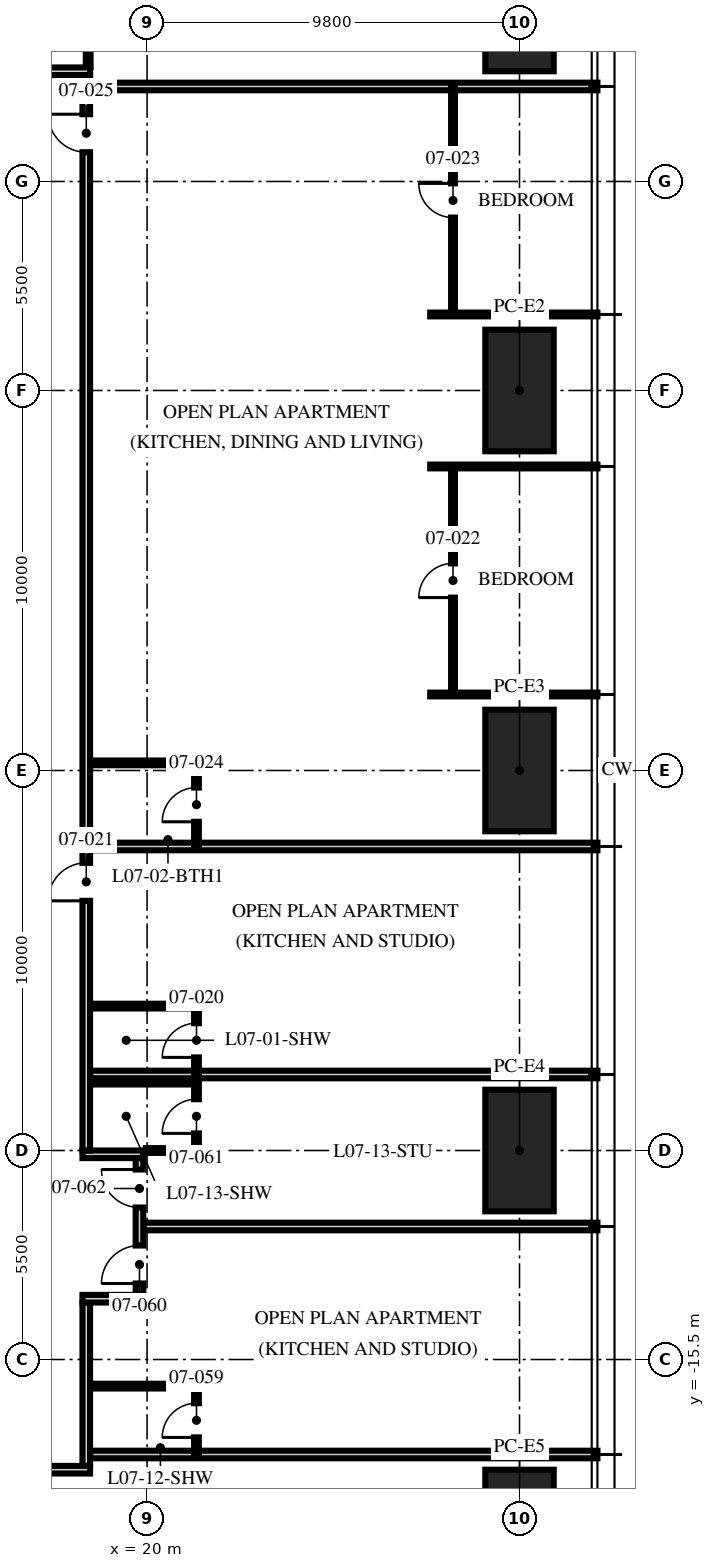
"""IFC4 building model, lengths in metres.
Left out: names, types, materials, properties, quantities, classifications, styles, units other than length and angle.
Written with IfcOpenShell. Run it as: python <this file> out.ifc"""

import sys

from ifc_helpers import new_model, si_unit, direction, frame, frame_2d, origin, origin_2d, place, context, subcontext, project, spatial, rectangle, hollow_rectangle, extrude, element, fill, save


model = new_model("IFC4")
c1 = context("Model", 3, precision=1e-05, world=origin(), true_north=direction((0.0, 1.0)))
c2 = subcontext(c1, "Body", "Model", "MODEL_VIEW")
j1 = project(units=[si_unit("LENGTHUNIT", "METRE"), si_unit("PLANEANGLEUNIT", "RADIAN")], contexts=[c1])
p1 = place(None, origin())
s1 = spatial("IfcSite", under=j1, at=p1, CompositionType="ELEMENT")
p2 = place(p1, origin())
s2 = spatial("IfcBuilding", under=s1, at=p2, CompositionType="ELEMENT")
p3 = place(p2, frame((0.0, 0.0, 32.25)))
s3 = spatial("IfcBuildingStorey", under=s2, at=p3, CompositionType="ELEMENT", Elevation=32.25)
for number, where, z_axis, x_axis in (
    (1, (29.8, 20.0, 0.0), (0.0, 0.0, 1.0), (0.0, 1.0, 0.0)),
    (2, (29.8, 10.0, 0.0), (0.0, 0.0, 1.0), (0.0, 1.0, 0.0)),
    (3, (29.8, 0.0, 0.0), (0.0, 0.0, 1.0), (0.0, 1.0, 0.0)),
    (4, (29.8, -10.0, 0.0), (0.0, 0.0, 1.0), (0.0, 1.0, 0.0)),
    (5, (29.8, -20.0, 0.0), (0.0, 0.0, 1.0), (0.0, 1.0, 0.0)),
):
    element("IfcColumn", number, at=place(p3, frame(where, z_axis=z_axis, x_axis=x_axis)), inside=s3, PredefinedType="COLUMN", context=c2, shape_type="SweptSolid", body=[
        extrude(hollow_rectangle(XDim=3.2, YDim=1.8, WallThickness=0.2, at=origin_2d()), origin(), (0.0, 0.0, 1.0), 3.75),
    ])
for number, where, z_axis, x_axis in (
    (6, (18.5, -8.0, 0.0), (0.0, 0.0, 1.0), (1.0, 0.0, 0.0)),
    (7, (18.5, -2.0, 0.0), (0.0, 0.0, 1.0), (1.0, 0.0, 0.0)),
):
    element("IfcWall", number, at=place(p3, frame(where, z_axis=z_axis, x_axis=x_axis)), inside=s3, PredefinedType="PARTITIONING", context=c2, shape_type="SweptSolid", body=[
        extrude(rectangle(XDim=13.35, YDim=0.2, at=frame_2d((6.675, 0.0))), origin(), (0.0, 0.0, 1.0), 2.71),
    ])
for number, where, z_axis, x_axis in (
    (8, (27.45, 2.0, 0.0), (0.0, 0.0, 1.0), (1.0, 0.0, 0.0)),
    (9, (27.45, 8.0, 0.0), (0.0, 0.0, 1.0), (1.0, 0.0, 0.0)),
    (10, (27.45, 12.0, 0.0), (0.0, 0.0, 1.0), (1.0, 0.0, 0.0)),
):
    element("IfcWall", number, at=place(p3, frame(where, z_axis=z_axis, x_axis=x_axis)), inside=s3, PredefinedType="PARTITIONING", context=c2, shape_type="SweptSolid", body=[
        extrude(rectangle(XDim=4.4, YDim=0.1, at=frame_2d((2.2, 0.0))), origin(), (0.0, 0.0, 1.0), 2.71),
    ])
for number, where, z_axis, x_axis in (
    (11, (18.5, 18.0, 0.0), (0.0, 0.0, 1.0), (1.0, 0.0, 0.0)),
    (12, (18.5, -18.0, 0.0), (0.0, 0.0, 1.0), (1.0, 0.0, 0.0)),
):
    element("IfcWall", number, at=place(p3, frame(where, z_axis=z_axis, x_axis=x_axis)), inside=s3, PredefinedType="PARTITIONING", context=c2, shape_type="SweptSolid", body=[
        extrude(rectangle(XDim=13.35, YDim=0.2, at=frame_2d((6.675, 0.0))), origin(), (0.0, 0.0, 1.0), 2.3),
    ])
p4 = place(p3, frame((19.9, -12.0, 0.0), z_axis=(0.0, 0.0, 1.0), x_axis=(1.0, 0.0, 0.0)))
e13 = element("IfcWall", 13, at=p4, inside=s3, PredefinedType="PARTITIONING", context=c2, shape_type="SweptSolid", body=[
    extrude(rectangle(XDim=11.95, YDim=0.2, at=frame_2d((5.975, 0.0))), origin(), (0.0, 0.0, 1.0), 2.71),
])
p5 = place(p3, frame((21.3, -8.0, 0.0), z_axis=(0.0, 0.0, 1.0), x_axis=(0.0, 1.0, 0.0)))
e14 = element("IfcWall", 14, at=p5, inside=s3, PredefinedType="PARTITIONING", context=c2, shape_type="SweptSolid", body=[
    extrude(rectangle(XDim=1.8, YDim=0.125, at=frame_2d((0.9, 0.0))), origin(), (0.0, 0.0, 1.0), 3.5),
])
p6 = place(p5, frame((0.45, 0.0, 0.0)))
e15 = element("IfcOpeningElement", 15, at=p6, cuts=e14, PredefinedType="OPENING", context=c2, shape_type="SweptSolid", body=[
    extrude(rectangle(XDim=0.9, YDim=2.1, at=frame_2d((0.45, 1.05))), frame((0.0, 0.073, 0.0), z_axis=(0.0, -1.0, 0.0), x_axis=(1.0, 0.0, 0.0)), (0.0, 0.0, 1.0), 0.145),
])
p7 = place(p3, frame((18.5, -6.2, 0.0), z_axis=(0.0, 0.0, 1.0), x_axis=(1.0, 0.0, 0.0)))
e16 = element("IfcWall", 16, at=p7, inside=s3, PredefinedType="PARTITIONING", context=c2, shape_type="SweptSolid", body=[
    extrude(rectangle(XDim=2.8, YDim=0.125, at=frame_2d((1.4, 0.0))), origin(), (0.0, 0.0, 1.0), 3.5),
])
p8 = place(p3, frame((28.05, 2.0, 0.0), z_axis=(0.0, 0.0, 1.0), x_axis=(0.0, 1.0, 0.0)))
e17 = element("IfcWall", 17, at=p8, inside=s3, PredefinedType="PARTITIONING", context=c2, shape_type="SweptSolid", body=[
    extrude(rectangle(XDim=6.0, YDim=0.1, at=frame_2d((3.0, 0.0))), origin(), (0.0, 0.0, 1.0), 2.61),
])
p9 = place(p8, frame((2.55, 0.0, 0.0)))
e18 = element("IfcOpeningElement", 18, at=p9, cuts=e17, PredefinedType="OPENING", context=c2, shape_type="SweptSolid", body=[
    extrude(rectangle(XDim=0.9, YDim=2.1, at=frame_2d((0.45, 1.05))), frame((0.0, 0.06, 0.0), z_axis=(0.0, -1.0, 0.0), x_axis=(1.0, 0.0, 0.0)), (0.0, 0.0, 1.0), 0.12),
])
p10 = place(p3, frame((28.05, 12.0, 0.0), z_axis=(0.0, 0.0, 1.0), x_axis=(0.0, 1.0, 0.0)))
e19 = element("IfcWall", 19, at=p10, inside=s3, PredefinedType="PARTITIONING", context=c2, shape_type="SweptSolid", body=[
    extrude(rectangle(XDim=6.0, YDim=0.1, at=frame_2d((3.0, 0.0))), origin(), (0.0, 0.0, 1.0), 2.61),
])
p11 = place(p10, frame((2.55, 0.0, 0.0)))
e20 = element("IfcOpeningElement", 20, at=p11, cuts=e19, PredefinedType="OPENING", context=c2, shape_type="SweptSolid", body=[
    extrude(rectangle(XDim=0.9, YDim=2.1, at=frame_2d((0.45, 1.05))), frame((0.0, 0.06, 0.0), z_axis=(0.0, -1.0, 0.0), x_axis=(1.0, 0.0, 0.0)), (0.0, 0.0, 1.0), 0.12),
])
p12 = place(p3, frame((21.3, -2.0, 0.0), z_axis=(0.0, 0.0, 1.0), x_axis=(0.0, 1.0, 0.0)))
e21 = element("IfcWall", 21, at=p12, inside=s3, PredefinedType="PARTITIONING", context=c2, shape_type="SweptSolid", body=[
    extrude(rectangle(XDim=2.2, YDim=0.125, at=frame_2d((1.1, 0.0))), origin(), (0.0, 0.0, 1.0), 2.492),
])
p13 = place(p12, frame((0.65, 0.0, 0.0)))
e22 = element("IfcOpeningElement", 22, at=p13, cuts=e21, PredefinedType="OPENING", context=c2, shape_type="SweptSolid", body=[
    extrude(rectangle(XDim=0.9, YDim=2.1, at=frame_2d((0.45, 1.05))), frame((0.0, 0.073, 0.0), z_axis=(0.0, -1.0, 0.0), x_axis=(1.0, 0.0, 0.0)), (0.0, 0.0, 1.0), 0.145),
])
p14 = place(p3, frame((18.5, 0.2, 0.0), z_axis=(0.0, 0.0, 1.0), x_axis=(1.0, 0.0, 0.0)))
e23 = element("IfcWall", 23, at=p14, inside=s3, PredefinedType="PARTITIONING", context=c2, shape_type="SweptSolid", body=[
    extrude(rectangle(XDim=2.8, YDim=0.125, at=frame_2d((1.4, 0.0))), origin(), (0.0, 0.0, 1.0), 2.492),
])
p15 = place(p3, frame((18.45, 18.5, 0.0), z_axis=(0.0, 0.0, 1.0), x_axis=(0.0, 1.0, 0.0)))
e24 = element("IfcWall", 24, at=p15, inside=s3, PredefinedType="PARTITIONING", context=c2, shape_type="SweptSolid", body=[
    extrude(rectangle(XDim=2.8, YDim=0.125, at=frame_2d((1.4, 0.0))), origin(), (0.0, 0.0, 1.0), 2.3),
])
p16 = place(p3, frame((21.3, -18.0, 0.0), z_axis=(0.0, 0.0, 1.0), x_axis=(0.0, 1.0, 0.0)))
e25 = element("IfcWall", 25, at=p16, inside=s3, PredefinedType="PARTITIONING", context=c2, shape_type="SweptSolid", body=[
    extrude(rectangle(XDim=1.8, YDim=0.125, at=frame_2d((0.9, 0.0))), origin(), (0.0, 0.0, 1.0), 3.5),
])
p17 = place(p16, frame((0.45, 0.0, 0.0)))
e26 = element("IfcOpeningElement", 26, at=p17, cuts=e25, PredefinedType="OPENING", context=c2, shape_type="SweptSolid", body=[
    extrude(rectangle(XDim=0.9, YDim=2.1, at=frame_2d((0.45, 1.05))), frame((0.0, 0.073, 0.0), z_axis=(0.0, -1.0, 0.0), x_axis=(1.0, 0.0, 0.0)), (0.0, 0.0, 1.0), 0.145),
])
p18 = place(p3, frame((18.5, -16.2, 0.0), z_axis=(0.0, 0.0, 1.0), x_axis=(1.0, 0.0, 0.0)))
e27 = element("IfcWall", 27, at=p18, inside=s3, PredefinedType="PARTITIONING", context=c2, shape_type="SweptSolid", body=[
    extrude(rectangle(XDim=2.8, YDim=0.125, at=frame_2d((1.4, 0.0))), origin(), (0.0, 0.0, 1.0), 3.5),
])
p19 = place(p3, frame((21.3, -10.0, 0.0), z_axis=(0.0, 0.0, 1.0), x_axis=(0.0, 1.0, 0.0)))
e28 = element("IfcWall", 28, at=p19, inside=s3, PredefinedType="PARTITIONING", context=c2, shape_type="SweptSolid", body=[
    extrude(rectangle(XDim=1.8, YDim=0.125, at=frame_2d((0.9, 0.0))), origin(), (0.0, 0.0, 1.0), 2.492),
])
p20 = place(p19, frame((0.45, 0.0, 0.0)))
e29 = element("IfcOpeningElement", 29, at=p20, cuts=e28, PredefinedType="OPENING", context=c2, shape_type="SweptSolid", body=[
    extrude(rectangle(XDim=0.9, YDim=2.1, at=frame_2d((0.45, 1.05))), frame((0.0, 0.073, 0.0), z_axis=(0.0, -1.0, 0.0), x_axis=(1.0, 0.0, 0.0)), (0.0, 0.0, 1.0), 0.145),
])
p21 = place(p3, frame((19.97, -10.0, 0.0), z_axis=(0.0, 0.0, 1.0), x_axis=(1.0, 0.0, 0.0)))
e30 = element("IfcWall", 30, at=p21, inside=s3, PredefinedType="PARTITIONING", context=c2, shape_type="SweptSolid", body=[
    extrude(rectangle(XDim=1.33, YDim=0.125, at=frame_2d((0.665, 0.0))), origin(), (0.0, 0.0, 1.0), 2.492),
])
p22 = place(p3, frame((18.5, -8.2, 0.0), z_axis=(0.0, 0.0, 1.0), x_axis=(1.0, 0.0, 0.0)))
e31 = element("IfcWall", 31, at=p22, inside=s3, PredefinedType="PARTITIONING", context=c2, shape_type="SweptSolid", body=[
    extrude(rectangle(XDim=2.8, YDim=0.125, at=frame_2d((1.4, 0.0))), origin(), (0.0, 0.0, 1.0), 3.5),
])
p23 = place(p3, frame((18.4, -18.3, 0.0), z_axis=(0.0, 0.0, 1.0), x_axis=(0.0, 1.0, 0.0)))
e32 = element("IfcWall", 32, at=p23, inside=s3, PredefinedType="PARTITIONING", context=c2, shape_type="SweptSolid", body=[
    extrude(rectangle(XDim=4.3, YDim=0.2, at=frame_2d((2.15, 0.0))), origin(), (0.0, 0.0, 1.0), 2.3),
])
p24 = place(p3, frame((18.3, -13.9, 0.0), z_axis=(0.0, 0.0, 1.0), x_axis=(1.0, 0.0, 0.0)))
e33 = element("IfcWall", 33, at=p24, inside=s3, PredefinedType="PARTITIONING", context=c2, shape_type="SweptSolid", body=[
    extrude(rectangle(XDim=1.6, YDim=0.2, at=frame_2d((0.8, 0.0))), origin(), (0.0, 0.0, 1.0), 3.5),
])
p25 = place(p3, frame((18.3, -10.1, 0.0), z_axis=(0.0, 0.0, 1.0), x_axis=(1.0, 0.0, 0.0)))
e34 = element("IfcWall", 34, at=p25, inside=s3, PredefinedType="PARTITIONING", context=c2, shape_type="SweptSolid", body=[
    extrude(rectangle(XDim=1.6, YDim=0.2, at=frame_2d((0.8, 0.0))), origin(), (0.0, 0.0, 1.0), 2.492),
])
p26 = place(p3, frame((19.8, -13.8, 0.0), z_axis=(0.0, 0.0, 1.0), x_axis=(0.0, 1.0, 0.0)))
e35 = element("IfcWall", 35, at=p26, inside=s3, PredefinedType="PARTITIONING", context=c2, shape_type="SweptSolid", body=[
    extrude(rectangle(XDim=3.6, YDim=0.2, at=frame_2d((1.8, 0.0))), origin(), (0.0, 0.0, 1.0), 3.5),
])
p27 = place(p26, frame((0.3, 0.0, 0.0)))
e36 = element("IfcOpeningElement", 36, at=p27, cuts=e35, PredefinedType="OPENING", context=c2, shape_type="SweptSolid", body=[
    extrude(rectangle(XDim=1.0, YDim=2.2, at=frame_2d((0.5, 1.1))), frame((0.0, 0.11, 0.0), z_axis=(0.0, -1.0, 0.0), x_axis=(1.0, 0.0, 0.0)), (0.0, 0.0, 1.0), 0.22),
])
p28 = place(p26, frame((2.3, 0.0, 0.0)))
e37 = element("IfcOpeningElement", 37, at=p28, cuts=e35, PredefinedType="OPENING", context=c2, shape_type="SweptSolid", body=[
    extrude(rectangle(XDim=1.0, YDim=2.2, at=frame_2d((0.5, 1.1))), frame((0.0, 0.11, 0.0), z_axis=(0.0, -1.0, 0.0), x_axis=(1.0, 0.0, 0.0)), (0.0, 0.0, 1.0), 0.22),
])
p29 = place(p3, frame((18.4, -10.0, 0.0), z_axis=(0.0, 0.0, 1.0), x_axis=(0.0, 1.0, 0.0)))
e38 = element("IfcWall", 38, at=p29, inside=s3, PredefinedType="PARTITIONING", context=c2, shape_type="SweptSolid", body=[
    extrude(rectangle(XDim=28.3, YDim=0.2, at=frame_2d((14.15, 0.0))), origin(), (0.0, 0.0, 1.0), 2.3),
])
p30 = place(p29, frame((6.57, 0.0, 0.0)))
e39 = element("IfcOpeningElement", 39, at=p30, cuts=e38, PredefinedType="OPENING", context=c2, shape_type="SweptSolid", body=[
    extrude(rectangle(XDim=1.0, YDim=2.2, at=frame_2d((0.5, 1.1))), frame((0.0, 0.11, 0.0), z_axis=(0.0, -1.0, 0.0), x_axis=(1.0, 0.0, 0.0)), (0.0, 0.0, 1.0), 0.22),
])
p31 = place(p29, frame((26.27, 0.0, 0.0)))
e40 = element("IfcOpeningElement", 40, at=p31, cuts=e38, PredefinedType="OPENING", context=c2, shape_type="SweptSolid", body=[
    extrude(rectangle(XDim=1.0, YDim=2.2, at=frame_2d((0.5, 1.1))), frame((0.0, 0.11, 0.0), z_axis=(0.0, -1.0, 0.0), x_axis=(1.0, 0.0, 0.0)), (0.0, 0.0, 1.0), 0.22),
])
p32 = place(p3, frame((-18.5, 18.4, 0.0), z_axis=(0.0, 0.0, 1.0), x_axis=(1.0, 0.0, 0.0)))
e41 = element("IfcWall", 41, at=p32, inside=s3, PredefinedType="PARTITIONING", context=c2, shape_type="SweptSolid", body=[
    extrude(rectangle(XDim=37.0, YDim=0.2, at=frame_2d((18.5, 0.0))), origin(), (0.0, 0.0, 1.0), 2.3),
])
p33 = place(p32, frame((27.1, 0.0, 0.0)))
e42 = element("IfcOpeningElement", 42, at=p33, cuts=e41, PredefinedType="OPENING", context=c2, shape_type="SweptSolid", body=[
    extrude(rectangle(XDim=1.0, YDim=2.2, at=frame_2d((0.5, 1.1))), frame((0.0, 0.11, 0.0), z_axis=(0.0, -1.0, 0.0), x_axis=(1.0, 0.0, 0.0)), (0.0, 0.0, 1.0), 0.22),
])
p34 = place(p32, frame((11.23, 0.0, 0.0)))
e43 = element("IfcOpeningElement", 43, at=p34, cuts=e41, PredefinedType="OPENING", context=c2, shape_type="SweptSolid", body=[
    extrude(rectangle(XDim=1.0, YDim=2.2, at=frame_2d((0.5, 1.1))), frame((0.0, 0.11, 0.0), z_axis=(0.0, -1.0, 0.0), x_axis=(1.0, 0.0, 0.0)), (0.0, 0.0, 1.0), 0.22),
])
p35 = place(p32, frame((6.93, 0.0, 0.0)))
e44 = element("IfcOpeningElement", 44, at=p35, cuts=e41, PredefinedType="OPENING", context=c2, shape_type="SweptSolid", body=[
    extrude(rectangle(XDim=1.0, YDim=2.2, at=frame_2d((0.5, 1.1))), frame((0.0, 0.11, 0.0), z_axis=(0.0, -1.0, 0.0), x_axis=(1.0, 0.0, 0.0)), (0.0, 0.0, 1.0), 0.22),
])
p36 = place(p32, frame((0.93, 0.0, 0.0)))
e45 = element("IfcOpeningElement", 45, at=p36, cuts=e41, PredefinedType="OPENING", context=c2, shape_type="SweptSolid", body=[
    extrude(rectangle(XDim=1.0, YDim=2.2, at=frame_2d((0.5, 1.1))), frame((0.0, 0.11, 0.0), z_axis=(0.0, -1.0, 0.0), x_axis=(1.0, 0.0, 0.0)), (0.0, 0.0, 1.0), 0.22),
])
p37 = place(p3, frame((18.5, -18.4, 0.0), z_axis=(0.0, 0.0, 1.0), x_axis=(-1.0, 0.0, 0.0)))
e46 = element("IfcWall", 46, at=p37, inside=s3, PredefinedType="PARTITIONING", context=c2, shape_type="SweptSolid", body=[
    extrude(rectangle(XDim=24.5, YDim=0.2, at=frame_2d((12.25, 0.0))), origin(), (0.0, 0.0, 1.0), 2.3),
])
p38 = place(p6, origin())
e47 = element("IfcDoor", 47, at=p38, inside=s3, OperationType="SINGLE_SWING_LEFT", PredefinedType="DOOR", context=c2, shape_type="SweptSolid", body=[
    extrude(rectangle(XDim=0.9, YDim=2.1, at=frame_2d((0.45, 1.05))), frame((0.0, 0.025, 0.0), z_axis=(0.0, -1.0, 0.0), x_axis=(1.0, 0.0, 0.0)), (0.0, 0.0, 1.0), 0.05),
])
fill(e15, e47)
p39 = place(p30, origin())
e48 = element("IfcDoor", 48, at=p39, inside=s3, OperationType="SINGLE_SWING_LEFT", PredefinedType="DOOR", context=c2, shape_type="SweptSolid", body=[
    extrude(rectangle(XDim=1.0, YDim=2.2, at=frame_2d((0.5, 1.1))), frame((0.0, 0.025, 0.0), z_axis=(0.0, -1.0, 0.0), x_axis=(1.0, 0.0, 0.0)), (0.0, 0.0, 1.0), 0.05),
])
fill(e39, e48)
p40 = place(p9, origin())
e49 = element("IfcDoor", 49, at=p40, inside=s3, OperationType="SINGLE_SWING_LEFT", PredefinedType="DOOR", context=c2, shape_type="SweptSolid", body=[
    extrude(rectangle(XDim=0.9, YDim=2.1, at=frame_2d((0.45, 1.05))), frame((0.0, 0.025, 0.0), z_axis=(0.0, -1.0, 0.0), x_axis=(1.0, 0.0, 0.0)), (0.0, 0.0, 1.0), 0.05),
])
fill(e18, e49)
p41 = place(p11, origin())
e50 = element("IfcDoor", 50, at=p41, inside=s3, OperationType="SINGLE_SWING_RIGHT", PredefinedType="DOOR", context=c2, shape_type="SweptSolid", body=[
    extrude(rectangle(XDim=0.9, YDim=2.1, at=frame_2d((0.45, 1.05))), frame((0.0, 0.025, 0.0), z_axis=(0.0, -1.0, 0.0), x_axis=(1.0, 0.0, 0.0)), (0.0, 0.0, 1.0), 0.05),
])
fill(e20, e50)
p42 = place(p13, origin())
e51 = element("IfcDoor", 51, at=p42, inside=s3, OperationType="SINGLE_SWING_LEFT", PredefinedType="DOOR", context=c2, shape_type="SweptSolid", body=[
    extrude(rectangle(XDim=0.9, YDim=2.1, at=frame_2d((0.45, 1.05))), frame((0.0, 0.025, 0.0), z_axis=(0.0, -1.0, 0.0), x_axis=(1.0, 0.0, 0.0)), (0.0, 0.0, 1.0), 0.05),
])
fill(e22, e51)
p43 = place(p31, origin())
e52 = element("IfcDoor", 52, at=p43, inside=s3, OperationType="SINGLE_SWING_RIGHT", PredefinedType="DOOR", context=c2, shape_type="SweptSolid", body=[
    extrude(rectangle(XDim=1.0, YDim=2.2, at=frame_2d((0.5, 1.1))), frame((0.0, 0.025, 0.0), z_axis=(0.0, -1.0, 0.0), x_axis=(1.0, 0.0, 0.0)), (0.0, 0.0, 1.0), 0.05),
])
fill(e40, e52)
p44 = place(p17, origin())
e53 = element("IfcDoor", 53, at=p44, inside=s3, OperationType="SINGLE_SWING_LEFT", PredefinedType="DOOR", context=c2, shape_type="SweptSolid", body=[
    extrude(rectangle(XDim=0.9, YDim=2.1, at=frame_2d((0.45, 1.05))), frame((0.0, 0.025, 0.0), z_axis=(0.0, -1.0, 0.0), x_axis=(1.0, 0.0, 0.0)), (0.0, 0.0, 1.0), 0.05),
])
fill(e26, e53)
p45 = place(p27, origin())
e54 = element("IfcDoor", 54, at=p45, inside=s3, OperationType="SINGLE_SWING_LEFT", PredefinedType="DOOR", context=c2, shape_type="SweptSolid", body=[
    extrude(rectangle(XDim=1.0, YDim=2.2, at=frame_2d((0.5, 1.1))), frame((0.0, 0.025, 0.0), z_axis=(0.0, -1.0, 0.0), x_axis=(1.0, 0.0, 0.0)), (0.0, 0.0, 1.0), 0.05),
])
fill(e36, e54)
p46 = place(p20, origin())
e55 = element("IfcDoor", 55, at=p46, inside=s3, OperationType="SINGLE_SWING_LEFT", PredefinedType="DOOR", context=c2, shape_type="SweptSolid", body=[
    extrude(rectangle(XDim=0.9, YDim=2.1, at=frame_2d((0.45, 1.05))), frame((0.0, 0.025, 0.0), z_axis=(0.0, -1.0, 0.0), x_axis=(1.0, 0.0, 0.0)), (0.0, 0.0, 1.0), 0.05),
])
fill(e29, e55)
p47 = place(p28, origin())
e56 = element("IfcDoor", 56, at=p47, inside=s3, OperationType="SINGLE_SWING_RIGHT", PredefinedType="DOOR", context=c2, shape_type="SweptSolid", body=[
    extrude(rectangle(XDim=1.0, YDim=2.2, at=frame_2d((0.5, 1.1))), frame((0.0, 0.025, 0.0), z_axis=(0.0, -1.0, 0.0), x_axis=(1.0, 0.0, 0.0)), (0.0, 0.0, 1.0), 0.05),
])
fill(e37, e56)
save(model, sys.argv[1])
